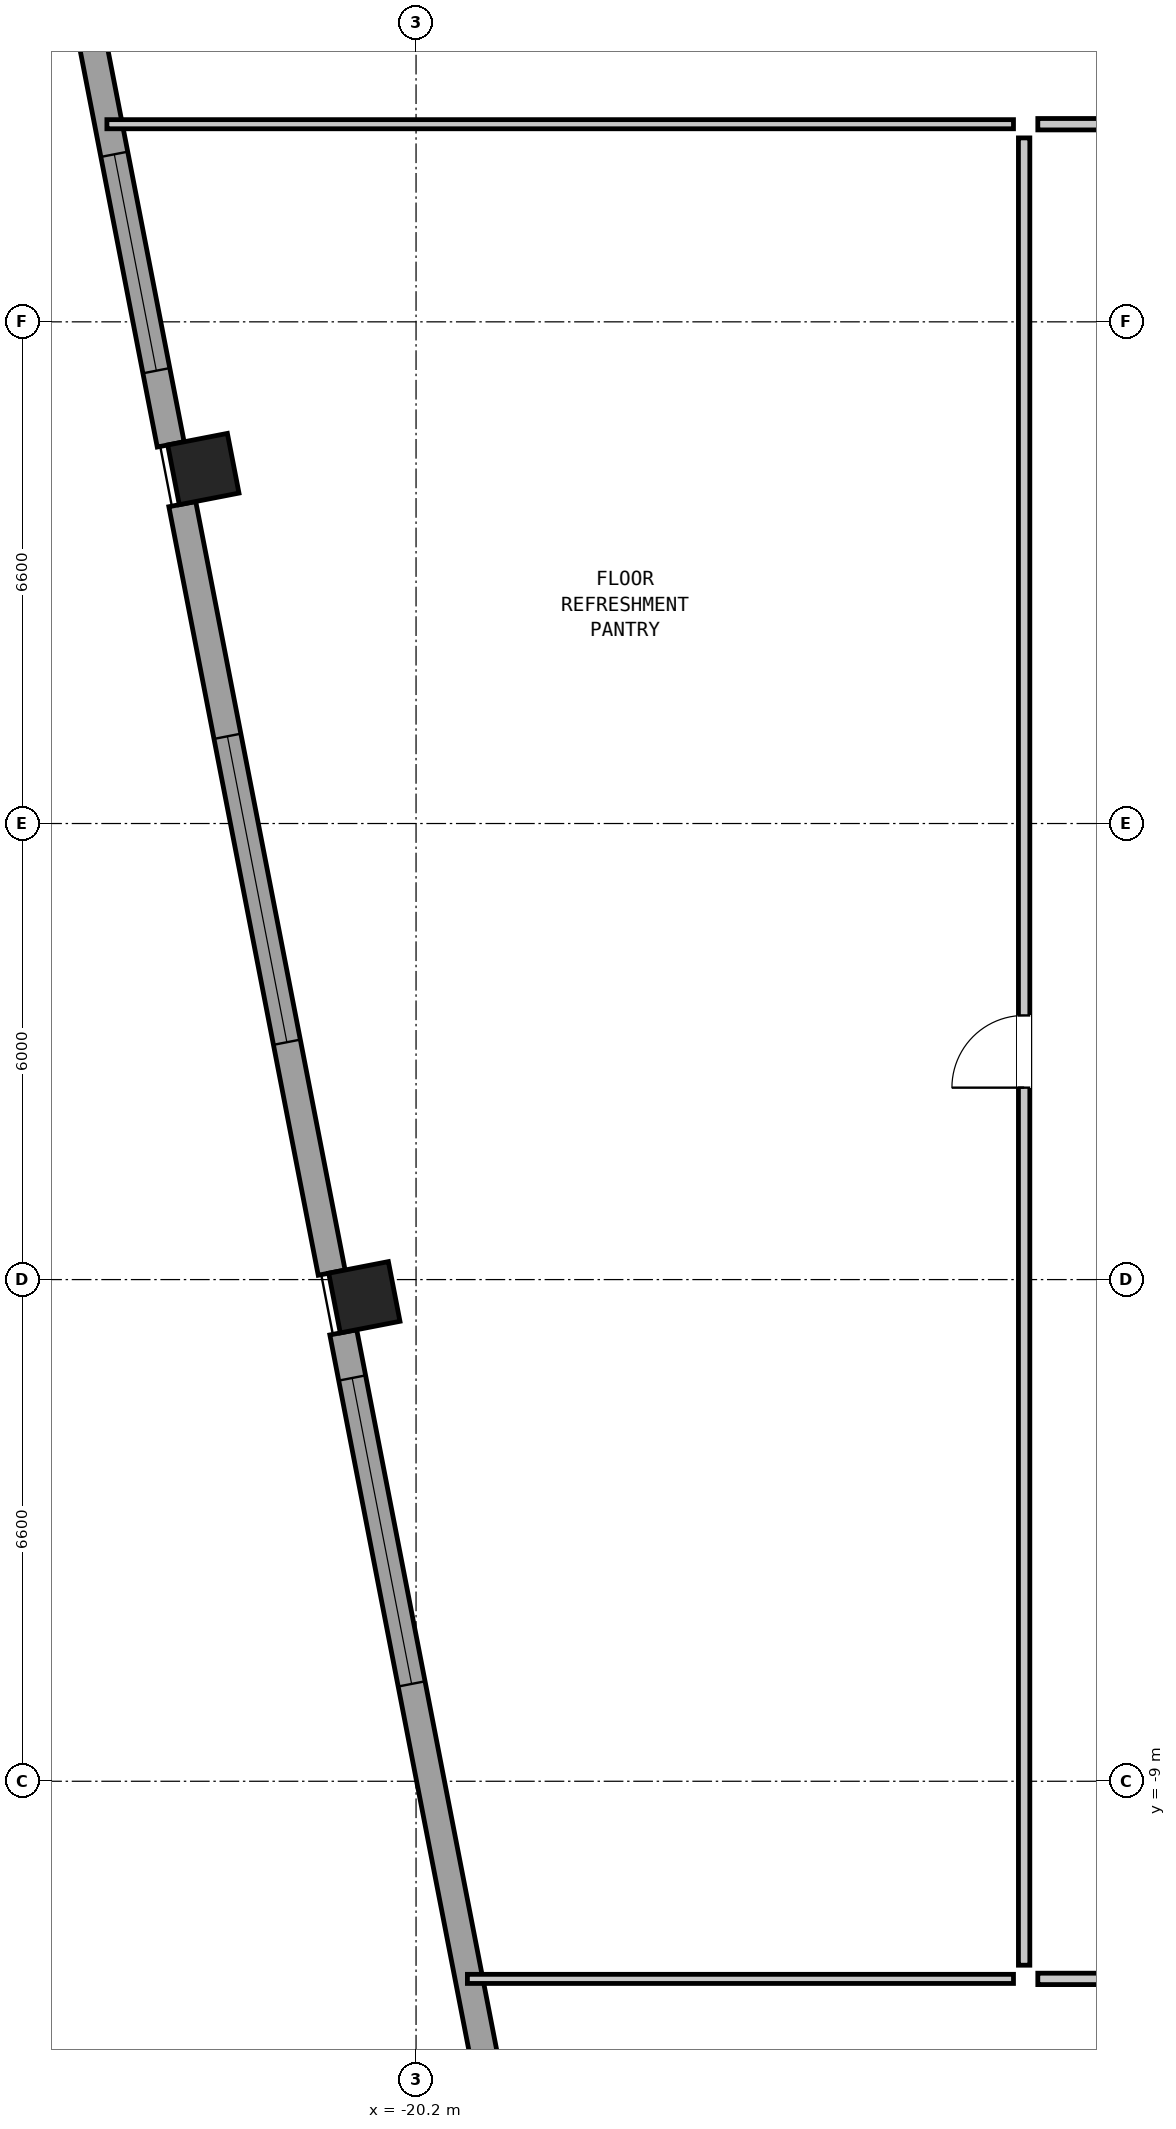
"""IFC4 building model, lengths in metres.
Left out: names, types, materials, properties, quantities, classifications, styles, units other than length and angle.
Written with IfcOpenShell. Run it as: python <this file> out.ifc"""

import sys

from ifc_helpers import new_model, si_unit, direction, frame, frame_2d, origin, origin_2d, place, context, subcontext, project, spatial, rectangle, hollow_rectangle, extrude, element, fill, save


model = new_model("IFC4")
c1 = context("Model", 3, precision=1e-05, world=origin(), true_north=direction((0.0, 1.0)))
c2 = subcontext(c1, "Body", "Model", "MODEL_VIEW")
j1 = project(units=[si_unit("LENGTHUNIT", "METRE"), si_unit("PLANEANGLEUNIT", "RADIAN")], contexts=[c1])
p1 = place(None, origin())
s1 = spatial("IfcSite", under=j1, at=p1, CompositionType="ELEMENT")
p2 = place(p1, origin())
s2 = spatial("IfcBuilding", under=s1, at=p2, CompositionType="ELEMENT")
p3 = place(p2, frame((0.0, 0.0, 112.8)))
s3 = spatial("IfcBuildingStorey", under=s2, at=p3, CompositionType="ELEMENT", Elevation=112.8)
for number, where, z_axis, x_axis in (
    (1, (-22.998, 8.263, 0.0), (0.0, 0.0, 1.0), (-0.191, 0.982, 0.0)),
    (2, (-20.88, -2.633, 0.0), (0.0, 0.0, 1.0), (-0.191, 0.982, 0.0)),
):
    element("IfcColumn", number, at=place(p3, frame(where, z_axis=z_axis, x_axis=x_axis)), inside=s3, PredefinedType="COLUMN", context=c2, shape_type="SweptSolid", body=[
        extrude(hollow_rectangle(XDim=0.8, YDim=0.8, WallThickness=0.05, at=origin_2d()), origin(), (0.0, 0.0, 1.0), 3.05),
    ])
p4 = place(p3, frame((-19.19, -13.217, 0.0), z_axis=(0.0, 0.0, 1.0), x_axis=(-0.190822765986, 0.981624506612, 0.0)))
e3 = element("IfcWall", 3, at=p4, inside=s3, PredefinedType="SOLIDWALL", context=c2, shape_type="SweptSolid", body=[
    extrude(rectangle(XDim=10.312, YDim=0.36, at=frame_2d((5.156, 0.0))), origin(), (0.0, 0.0, 1.0), 1.632),
])
p5 = place(p4, frame((5.6, 0.0, 0.2)))
e4 = element("IfcOpeningElement", 4, at=p5, cuts=e3, PredefinedType="OPENING", context=c2, shape_type="SweptSolid", body=[
    extrude(rectangle(XDim=4.1, YDim=1.05, at=frame_2d((2.05, 0.525))), frame((0.0, 0.192, 0.0), z_axis=(0.0, -1.0, 0.0), x_axis=(1.0, 0.0, 0.0)), (0.0, 0.0, 1.0), 0.384),
])
p6 = place(p3, frame((-21.31, -2.309, 0.0), z_axis=(0.0, 0.0, 1.0), x_axis=(-0.190811924826, 0.981626614016, 0.0)))
e5 = element("IfcWall", 5, at=p6, inside=s3, PredefinedType="SOLIDWALL", context=c2, shape_type="SweptSolid", body=[
    extrude(rectangle(XDim=10.3, YDim=0.36, at=frame_2d((5.15, 0.0))), origin(), (0.0, 0.0, 1.0), 1.632),
])
p7 = place(p6, frame((3.088, 0.0, 0.2)))
e6 = element("IfcOpeningElement", 6, at=p7, cuts=e5, PredefinedType="OPENING", context=c2, shape_type="SweptSolid", body=[
    extrude(rectangle(XDim=4.1, YDim=1.05, at=frame_2d((2.05, 0.525))), frame((0.0, 0.192, 0.0), z_axis=(0.0, -1.0, 0.0), x_axis=(1.0, 0.0, 0.0)), (0.0, 0.0, 1.0), 0.384),
])
p8 = place(p3, frame((-23.428, 8.587, 0.0), z_axis=(0.0, 0.0, 1.0), x_axis=(-0.190822765986, 0.981624506612, 0.0)))
e7 = element("IfcWall", 7, at=p8, inside=s3, PredefinedType="SOLIDWALL", context=c2, shape_type="SweptSolid", body=[
    extrude(rectangle(XDim=10.312, YDim=0.36, at=frame_2d((5.156, 0.0))), origin(), (0.0, 0.0, 1.0), 1.632),
])
p9 = place(p8, frame((0.988, 0.0, 0.2)))
e8 = element("IfcOpeningElement", 8, at=p9, cuts=e7, PredefinedType="OPENING", context=c2, shape_type="SweptSolid", body=[
    extrude(rectangle(XDim=2.9, YDim=1.25, at=frame_2d((1.45, 0.625))), frame((0.0, 0.192, 0.0), z_axis=(0.0, -1.0, 0.0), x_axis=(1.0, 0.0, 0.0)), (0.0, 0.0, 1.0), 0.384),
])
p10 = place(p3, frame((-24.267, 12.8, 0.0), z_axis=(0.0, 0.0, 1.0), x_axis=(1.0, 0.0, 0.0)))
e9 = element("IfcWall", 9, at=p10, inside=s3, PredefinedType="PARTITIONING", context=c2, shape_type="SweptSolid", body=[
    extrude(rectangle(XDim=11.927, YDim=0.12, at=frame_2d((5.964, 0.0))), origin(), (0.0, 0.0, 1.0), 2.83),
])
p11 = place(p3, frame((-19.524, -11.6, 0.0), z_axis=(0.0, 0.0, 1.0), x_axis=(1.0, 0.0, 0.0)))
e10 = element("IfcWall", 10, at=p11, inside=s3, PredefinedType="PARTITIONING", context=c2, shape_type="SweptSolid", body=[
    extrude(rectangle(XDim=7.184, YDim=0.12, at=frame_2d((3.592, 0.0))), origin(), (0.0, 0.0, 1.0), 2.347),
])
p12 = place(p3, frame((-12.02, 12.8, 0.0), z_axis=(0.0, 0.0, 1.0), x_axis=(1.0, 0.0, 0.0)))
e11 = element("IfcWall", 11, at=p12, inside=s3, PredefinedType="PARTITIONING", context=c2, shape_type="SweptSolid", body=[
    extrude(rectangle(XDim=9.54, YDim=0.15, at=frame_2d((4.77, 0.0))), origin(), (0.0, 0.0, 1.0), 2.83),
])
p13 = place(p12, frame((4.295, 0.0, 0.0)))
e12 = element("IfcOpeningElement", 12, at=p13, cuts=e11, PredefinedType="OPENING", context=c2, shape_type="SweptSolid", body=[
    extrude(rectangle(XDim=0.95, YDim=2.1, at=frame_2d((0.475, 1.05))), frame((0.0, 0.087, 0.0), z_axis=(0.0, -1.0, 0.0), x_axis=(1.0, 0.0, 0.0)), (0.0, 0.0, 1.0), 0.174),
])
p14 = place(p3, frame((-12.02, -11.6, 0.0), z_axis=(0.0, 0.0, 1.0), x_axis=(1.0, 0.0, 0.0)))
e13 = element("IfcWall", 13, at=p14, inside=s3, PredefinedType="PARTITIONING", context=c2, shape_type="SweptSolid", body=[
    extrude(rectangle(XDim=24.04, YDim=0.15, at=frame_2d((12.02, 0.0))), origin(), (0.0, 0.0, 1.0), 2.347),
])
p15 = place(p14, frame((11.545, 0.0, 0.0)))
e14 = element("IfcOpeningElement", 14, at=p15, cuts=e13, PredefinedType="OPENING", context=c2, shape_type="SweptSolid", body=[
    extrude(rectangle(XDim=0.95, YDim=2.1, at=frame_2d((0.475, 1.05))), frame((0.0, 0.087, 0.0), z_axis=(0.0, -1.0, 0.0), x_axis=(1.0, 0.0, 0.0)), (0.0, 0.0, 1.0), 0.174),
])
p16 = place(p3, frame((-12.2, -11.42, 0.0), z_axis=(0.0, 0.0, 1.0), x_axis=(0.0, 1.0, 0.0)))
e15 = element("IfcWall", 15, at=p16, inside=s3, PredefinedType="PARTITIONING", context=c2, shape_type="SweptSolid", body=[
    extrude(rectangle(XDim=24.04, YDim=0.15, at=frame_2d((12.02, 0.0))), origin(), (0.0, 0.0, 1.0), 2.83),
])
p17 = place(p16, frame((11.545, 0.0, 0.0)))
e16 = element("IfcOpeningElement", 16, at=p17, cuts=e15, PredefinedType="OPENING", context=c2, shape_type="SweptSolid", body=[
    extrude(rectangle(XDim=0.95, YDim=2.1, at=frame_2d((0.475, 1.05))), frame((0.0, 0.087, 0.0), z_axis=(0.0, -1.0, 0.0), x_axis=(1.0, 0.0, 0.0)), (0.0, 0.0, 1.0), 0.174),
])
p18 = place(p5, origin())
e17 = element("IfcWindow", 17, at=p18, inside=s3, PartitioningType="SINGLE_PANEL", PredefinedType="WINDOW", context=c2, shape_type="SweptSolid", body=[
    extrude(rectangle(XDim=4.1, YDim=1.05, at=frame_2d((2.05, 0.525))), frame((0.0, 0.03, 0.0), z_axis=(0.0, -1.0, 0.0), x_axis=(1.0, 0.0, 0.0)), (0.0, 0.0, 1.0), 0.06),
])
fill(e4, e17)
p19 = place(p7, origin())
e18 = element("IfcWindow", 18, at=p19, inside=s3, PartitioningType="SINGLE_PANEL", PredefinedType="WINDOW", context=c2, shape_type="SweptSolid", body=[
    extrude(rectangle(XDim=4.1, YDim=1.05, at=frame_2d((2.05, 0.525))), frame((0.0, 0.03, 0.0), z_axis=(0.0, -1.0, 0.0), x_axis=(1.0, 0.0, 0.0)), (0.0, 0.0, 1.0), 0.06),
])
fill(e6, e18)
p20 = place(p9, origin())
e19 = element("IfcWindow", 19, at=p20, inside=s3, PartitioningType="SINGLE_PANEL", PredefinedType="WINDOW", context=c2, shape_type="SweptSolid", body=[
    extrude(rectangle(XDim=2.9, YDim=1.25, at=frame_2d((1.45, 0.625))), frame((0.0, 0.03, 0.0), z_axis=(0.0, -1.0, 0.0), x_axis=(1.0, 0.0, 0.0)), (0.0, 0.0, 1.0), 0.06),
])
fill(e8, e19)
p21 = place(p17, origin())
e20 = element("IfcDoor", 20, at=p21, inside=s3, OperationType="SINGLE_SWING_LEFT", PredefinedType="DOOR", context=c2, shape_type="SweptSolid", body=[
    extrude(rectangle(XDim=0.95, YDim=2.1, at=frame_2d((0.475, 1.05))), frame((0.0, 0.025, 0.0), z_axis=(0.0, -1.0, 0.0), x_axis=(1.0, 0.0, 0.0)), (0.0, 0.0, 1.0), 0.05),
])
fill(e16, e20)
save(model, sys.argv[1])
